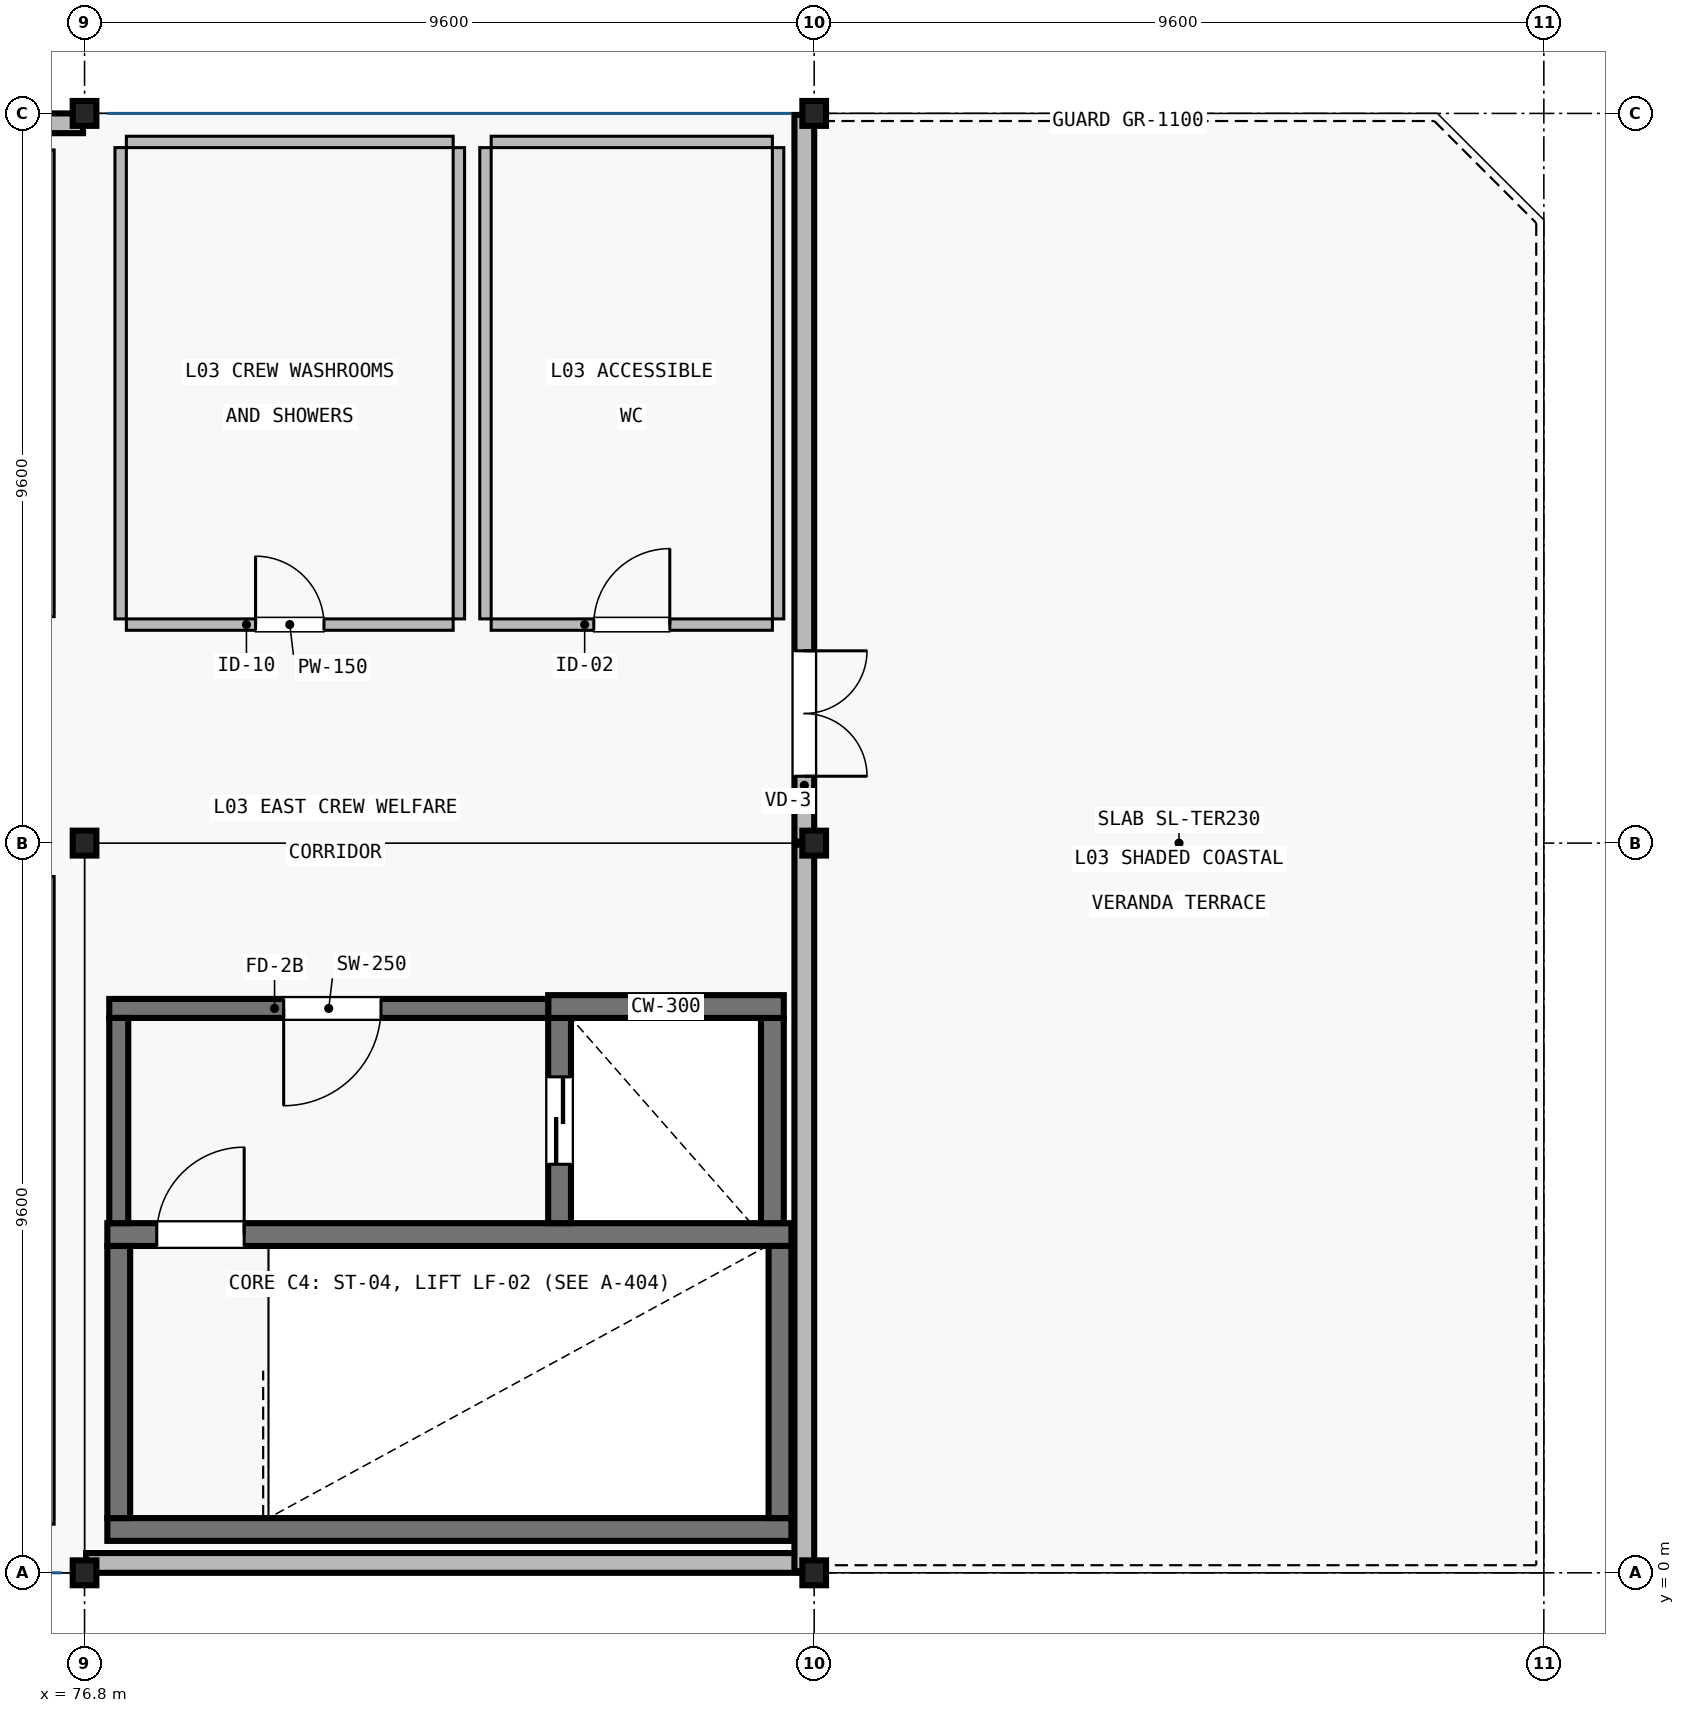
"""IFC4 building model, lengths in metres.
Left out: names, types, materials, properties, quantities, classifications, styles, units other than length and angle.
Written with IfcOpenShell. Run it as: python <this file> out.ifc"""

import sys

from ifc_helpers import new_model, si_unit, direction, frame, frame_2d, origin, origin_2d, place, context, subcontext, project, spatial, rectangle, i_section, extrude, element, fill, save


model = new_model("IFC4")
c1 = context("Model", 3, precision=1e-05, world=origin(), true_north=direction((0.0, 1.0)))
c2 = subcontext(c1, "Body", "Model", "MODEL_VIEW")
j1 = project(units=[si_unit("LENGTHUNIT", "METRE"), si_unit("PLANEANGLEUNIT", "RADIAN")], contexts=[c1])
p1 = place(None, origin())
s1 = spatial("IfcSite", under=j1, at=p1, CompositionType="ELEMENT")
p2 = place(p1, origin())
s2 = spatial("IfcBuilding", under=s1, at=p2, CompositionType="ELEMENT")
p3 = place(p2, frame((0.0, 0.0, 14.7)))
s3 = spatial("IfcBuildingStorey", under=s2, at=p3, CompositionType="ELEMENT", Elevation=14.7)
for number, where, z_axis, x_axis in (
    (1, (76.8, 0.0, 0.0), (0.0, 0.0, 1.0), (1.0, 0.0, 0.0)),
    (2, (76.8, 9.6, 0.0), (0.0, 0.0, 1.0), (1.0, 0.0, 0.0)),
    (3, (76.8, 19.2, 0.0), (0.0, 0.0, 1.0), (1.0, 0.0, 0.0)),
    (4, (86.4, 0.0, 0.0), (0.0, 0.0, 1.0), (1.0, 0.0, 0.0)),
    (5, (86.4, 9.6, 0.0), (0.0, 0.0, 1.0), (1.0, 0.0, 0.0)),
    (6, (86.4, 19.2, 0.0), (0.0, 0.0, 1.0), (1.0, 0.0, 0.0)),
):
    element("IfcColumn", number, at=place(p3, frame(where, z_axis=z_axis, x_axis=x_axis)), inside=s3, PredefinedType="COLUMN", context=c2, shape_type="SweptSolid", body=[
        extrude(i_section(OverallWidth=0.311, OverallDepth=0.327, WebThickness=0.016, FlangeThickness=0.025, FilletRadius=0.015, at=origin_2d()), origin(), (0.0, 0.0, 1.0), 3.95),
    ])
p4 = place(p3, frame((77.1, 0.57, 0.0), z_axis=(0.0, 0.0, 1.0), x_axis=(1.0, 0.0, 0.0)))
e7 = element("IfcWall", 7, at=p4, inside=s3, PredefinedType="SHEAR", context=c2, shape_type="SweptSolid", body=[
    extrude(rectangle(XDim=9.0, YDim=0.3, at=frame_2d((4.5, 0.0))), origin(), (0.0, 0.0, 1.0), 3.95),
])
p5 = place(p3, frame((86.1, 4.45, 0.0), z_axis=(0.0, 0.0, 1.0), x_axis=(-1.0, 0.0, 0.0)))
e8 = element("IfcWall", 8, at=p5, inside=s3, PredefinedType="SHEAR", context=c2, shape_type="SweptSolid", body=[
    extrude(rectangle(XDim=9.0, YDim=0.3, at=frame_2d((4.5, 0.0))), origin(), (0.0, 0.0, 1.0), 4.2),
])
p6 = place(p5, frame((7.2, 0.0, 0.0)))
e9 = element("IfcOpeningElement", 9, at=p6, cuts=e8, PredefinedType="OPENING", context=c2, shape_type="SweptSolid", body=[
    extrude(rectangle(XDim=1.15, YDim=2.15, at=frame_2d((0.575, 1.075))), frame((0.0, 0.16, 0.0), z_axis=(0.0, -1.0, 0.0), x_axis=(1.0, 0.0, 0.0)), (0.0, 0.0, 1.0), 0.32),
])
for number, where, z_axis, x_axis in (
    (10, (77.25, 0.72, 0.0), (0.0, 0.0, 1.0), (0.0, 1.0, 0.0)),
    (11, (85.95, 4.3, 0.0), (0.0, 0.0, 1.0), (0.0, -1.0, 0.0)),
):
    element("IfcWall", number, at=place(p3, frame(where, z_axis=z_axis, x_axis=x_axis)), inside=s3, PredefinedType="SHEAR", context=c2, shape_type="SweptSolid", body=[
        extrude(rectangle(XDim=3.58, YDim=0.3, at=frame_2d((1.79, 0.0))), origin(), (0.0, 0.0, 1.0), 3.95),
    ])
p7 = place(p3, frame((83.05, 7.3, 0.0), z_axis=(0.0, 0.0, 1.0), x_axis=(0.0, -1.0, 0.0)))
e12 = element("IfcWall", 12, at=p7, inside=s3, PredefinedType="SHEAR", context=c2, shape_type="SweptSolid", body=[
    extrude(rectangle(XDim=2.7, YDim=0.3, at=frame_2d((1.35, 0.0))), origin(), (0.0, 0.0, 1.0), 4.2),
])
p8 = place(p7, frame((0.775, 0.0, 0.0)))
e13 = element("IfcOpeningElement", 13, at=p8, cuts=e12, PredefinedType="OPENING", context=c2, shape_type="SweptSolid", body=[
    extrude(rectangle(XDim=1.15, YDim=2.1, at=frame_2d((0.575, 1.05))), frame((0.0, 0.16, 0.0), z_axis=(0.0, -1.0, 0.0), x_axis=(1.0, 0.0, 0.0)), (0.0, 0.0, 1.0), 0.32),
])
p9 = place(p3, frame((85.85, 4.6, 0.0), z_axis=(0.0, 0.0, 1.0), x_axis=(0.0, 1.0, 0.0)))
e14 = element("IfcWall", 14, at=p9, inside=s3, PredefinedType="SHEAR", context=c2, shape_type="SweptSolid", body=[
    extrude(rectangle(XDim=2.7, YDim=0.3, at=frame_2d((1.35, 0.0))), origin(), (0.0, 0.0, 1.0), 4.2),
])
p10 = place(p3, frame((82.9, 7.45, 0.0), z_axis=(0.0, 0.0, 1.0), x_axis=(1.0, 0.0, 0.0)))
e15 = element("IfcWall", 15, at=p10, inside=s3, PredefinedType="SHEAR", context=c2, shape_type="SweptSolid", body=[
    extrude(rectangle(XDim=3.1, YDim=0.3, at=frame_2d((1.55, 0.0))), origin(), (0.0, 0.0, 1.0), 4.2),
])
p11 = place(p3, frame((82.9, 7.425, 0.0), z_axis=(0.0, 0.0, 1.0), x_axis=(-1.0, 0.0, 0.0)))
e16 = element("IfcWall", 16, at=p11, inside=s3, PredefinedType="SHEAR", context=c2, shape_type="SweptSolid", body=[
    extrude(rectangle(XDim=5.775, YDim=0.25, at=frame_2d((2.887, 0.0))), origin(), (0.0, 0.0, 1.0), 3.95),
])
p12 = place(p11, frame((2.2, 0.0, 0.0)))
e17 = element("IfcOpeningElement", 17, at=p12, cuts=e16, PredefinedType="OPENING", context=c2, shape_type="SweptSolid", body=[
    extrude(rectangle(XDim=1.28, YDim=2.2, at=frame_2d((0.64, 1.1))), frame((0.0, 0.135, 0.0), z_axis=(0.0, -1.0, 0.0), x_axis=(1.0, 0.0, 0.0)), (0.0, 0.0, 1.0), 0.27),
])
p13 = place(p3, frame((77.25, 4.6, 0.0), z_axis=(0.0, 0.0, 1.0), x_axis=(0.0, 1.0, 0.0)))
e18 = element("IfcWall", 18, at=p13, inside=s3, PredefinedType="SHEAR", context=c2, shape_type="SweptSolid", body=[
    extrude(rectangle(XDim=2.7, YDim=0.25, at=frame_2d((1.35, 0.0))), origin(), (0.0, 0.0, 1.0), 3.95),
])
p14 = place(p3, frame((67.22, 19.07, 0.0), z_axis=(0.0, 0.0, 1.0), x_axis=(1.0, 0.0, 0.0)))
e19 = element("IfcWall", 19, at=p14, inside=s3, PredefinedType="SOLIDWALL", context=c2, shape_type="SweptSolid", body=[
    extrude(rectangle(XDim=9.56, YDim=0.26, at=frame_2d((4.78, 0.0))), origin(), (0.0, 0.0, 1.0), 3.66),
])
p15 = place(p14, frame((3.43, 0.0, 0.9)))
e20 = element("IfcOpeningElement", 20, at=p15, cuts=e19, PredefinedType="OPENING", context=c2, shape_type="SweptSolid", body=[
    extrude(rectangle(XDim=2.7, YDim=2.4, at=frame_2d((1.35, 1.2))), frame((0.0, 0.14, 0.0), z_axis=(0.0, -1.0, 0.0), x_axis=(1.0, 0.0, 0.0)), (0.0, 0.0, 1.0), 0.28),
])
p16 = place(p3, frame((86.38, 0.13, 0.0), z_axis=(0.0, 0.0, 1.0), x_axis=(-1.0, 0.0, 0.0)))
e21 = element("IfcWall", 21, at=p16, inside=s3, PredefinedType="SOLIDWALL", context=c2, shape_type="SweptSolid", body=[
    extrude(rectangle(XDim=9.56, YDim=0.26, at=frame_2d((4.78, 0.0))), origin(), (0.0, 0.0, 1.0), 3.66),
])
p17 = place(p3, frame((86.27, 9.58, 0.0), z_axis=(0.0, 0.0, 1.0), x_axis=(0.0, -1.0, 0.0)))
e22 = element("IfcWall", 22, at=p17, inside=s3, PredefinedType="SOLIDWALL", context=c2, shape_type="SweptSolid", body=[
    extrude(rectangle(XDim=9.56, YDim=0.26, at=frame_2d((4.78, 0.0))), origin(), (0.0, 0.0, 1.0), 3.493),
])
p18 = place(p3, frame((86.27, 19.18, 0.0), z_axis=(0.0, 0.0, 1.0), x_axis=(0.0, -1.0, 0.0)))
e23 = element("IfcWall", 23, at=p18, inside=s3, PredefinedType="SOLIDWALL", context=c2, shape_type="SweptSolid", body=[
    extrude(rectangle(XDim=9.56, YDim=0.26, at=frame_2d((4.78, 0.0))), origin(), (0.0, 0.0, 1.0), 3.493),
])
p19 = place(p18, frame((7.05, 0.0, 0.0)))
e24 = element("IfcOpeningElement", 24, at=p19, cuts=e23, PredefinedType="OPENING", context=c2, shape_type="SweptSolid", body=[
    extrude(rectangle(XDim=1.65, YDim=2.2, at=frame_2d((0.825, 1.1))), frame((0.0, 0.14, 0.0), z_axis=(0.0, -1.0, 0.0), x_axis=(1.0, 0.0, 0.0)), (0.0, 0.0, 1.0), 0.28),
])
p20 = place(p3, frame((76.33, 9.16, 0.0), z_axis=(0.0, 0.0, 1.0), x_axis=(0.0, -1.0, 0.0)))
e25 = element("IfcWall", 25, at=p20, inside=s3, PredefinedType="PARTITIONING", context=c2, shape_type="SweptSolid", body=[
    extrude(rectangle(XDim=8.52, YDim=0.14, at=frame_2d((4.26, 0.0))), origin(), (0.0, 0.0, 1.0), 3.59),
])
p21 = place(p3, frame((76.31, 18.72, 0.0), z_axis=(0.0, 0.0, 1.0), x_axis=(0.0, -1.0, 0.0)))
e26 = element("IfcWall", 26, at=p21, inside=s3, PredefinedType="PARTITIONING", context=c2, shape_type="SweptSolid", body=[
    extrude(rectangle(XDim=6.14, YDim=0.18, at=frame_2d((3.07, 0.0))), origin(), (0.0, 0.0, 1.0), 3.59),
])
p22 = place(p3, frame((81.65, 12.475, 0.0), z_axis=(0.0, 0.0, 1.0), x_axis=(-1.0, 0.0, 0.0)))
e27 = element("IfcWall", 27, at=p22, inside=s3, PredefinedType="PLUMBINGWALL", context=c2, shape_type="SweptSolid", body=[
    extrude(rectangle(XDim=4.3, YDim=0.15, at=frame_2d((2.15, 0.0))), origin(), (0.0, 0.0, 1.0), 3.59),
])
p23 = place(p22, frame((1.7, 0.0, 0.0)))
e28 = element("IfcOpeningElement", 28, at=p23, cuts=e27, PredefinedType="OPENING", context=c2, shape_type="SweptSolid", body=[
    extrude(rectangle(XDim=0.9, YDim=2.1, at=frame_2d((0.45, 1.05))), frame((0.0, 0.085, 0.0), z_axis=(0.0, -1.0, 0.0), x_axis=(1.0, 0.0, 0.0)), (0.0, 0.0, 1.0), 0.17),
])
p24 = place(p3, frame((77.35, 18.825, 0.0), z_axis=(0.0, 0.0, 1.0), x_axis=(1.0, 0.0, 0.0)))
e29 = element("IfcWall", 29, at=p24, inside=s3, PredefinedType="PLUMBINGWALL", context=c2, shape_type="SweptSolid", body=[
    extrude(rectangle(XDim=4.3, YDim=0.15, at=frame_2d((2.15, 0.0))), origin(), (0.0, 0.0, 1.0), 3.59),
])
for number, where, z_axis, x_axis in (
    (30, (77.275, 12.55, 0.0), (0.0, 0.0, 1.0), (0.0, 1.0, 0.0)),
    (31, (81.725, 18.75, 0.0), (0.0, 0.0, 1.0), (0.0, -1.0, 0.0)),
):
    element("IfcWall", number, at=place(p3, frame(where, z_axis=z_axis, x_axis=x_axis)), inside=s3, PredefinedType="PLUMBINGWALL", context=c2, shape_type="SweptSolid", body=[
        extrude(rectangle(XDim=6.2, YDim=0.15, at=frame_2d((3.1, 0.0))), origin(), (0.0, 0.0, 1.0), 3.59),
    ])
p25 = place(p3, frame((85.85, 12.475, 0.0), z_axis=(0.0, 0.0, 1.0), x_axis=(-1.0, 0.0, 0.0)))
e32 = element("IfcWall", 32, at=p25, inside=s3, PredefinedType="PLUMBINGWALL", context=c2, shape_type="SweptSolid", body=[
    extrude(rectangle(XDim=3.7, YDim=0.15, at=frame_2d((1.85, 0.0))), origin(), (0.0, 0.0, 1.0), 3.59),
])
p26 = place(p25, frame((1.35, 0.0, 0.0)))
e33 = element("IfcOpeningElement", 33, at=p26, cuts=e32, PredefinedType="OPENING", context=c2, shape_type="SweptSolid", body=[
    extrude(rectangle(XDim=1.0, YDim=2.15, at=frame_2d((0.5, 1.075))), frame((0.0, 0.085, 0.0), z_axis=(0.0, -1.0, 0.0), x_axis=(1.0, 0.0, 0.0)), (0.0, 0.0, 1.0), 0.17),
])
p27 = place(p3, frame((82.15, 18.825, 0.0), z_axis=(0.0, 0.0, 1.0), x_axis=(1.0, 0.0, 0.0)))
e34 = element("IfcWall", 34, at=p27, inside=s3, PredefinedType="PLUMBINGWALL", context=c2, shape_type="SweptSolid", body=[
    extrude(rectangle(XDim=3.7, YDim=0.15, at=frame_2d((1.85, 0.0))), origin(), (0.0, 0.0, 1.0), 3.59),
])
for number, where, z_axis, x_axis in (
    (35, (82.075, 12.55, 0.0), (0.0, 0.0, 1.0), (0.0, 1.0, 0.0)),
    (36, (85.925, 18.75, 0.0), (0.0, 0.0, 1.0), (0.0, -1.0, 0.0)),
):
    element("IfcWall", number, at=place(p3, frame(where, z_axis=z_axis, x_axis=x_axis)), inside=s3, PredefinedType="PLUMBINGWALL", context=c2, shape_type="SweptSolid", body=[
        extrude(rectangle(XDim=6.2, YDim=0.15, at=frame_2d((3.1, 0.0))), origin(), (0.0, 0.0, 1.0), 3.59),
    ])
p28 = place(p6, frame((1.15, 0.0, 0.0), z_axis=(0.0, 0.0, 1.0), x_axis=(-1.0, 0.0, 0.0)))
e37 = element("IfcDoor", 37, at=p28, inside=s3, OperationType="SINGLE_SWING_LEFT", PredefinedType="DOOR", context=c2, shape_type="SweptSolid", body=[
    extrude(rectangle(XDim=1.15, YDim=2.15, at=frame_2d((0.575, 1.075))), frame((0.0, 0.025, 0.0), z_axis=(0.0, -1.0, 0.0), x_axis=(1.0, 0.0, 0.0)), (0.0, 0.0, 1.0), 0.05),
])
fill(e9, e37)
p29 = place(p8, frame((1.15, 0.0, 0.0), z_axis=(0.0, 0.0, 1.0), x_axis=(-1.0, 0.0, 0.0)))
e38 = element("IfcDoor", 38, at=p29, inside=s3, OperationType="DOUBLE_DOOR_SLIDING", PredefinedType="DOOR", context=c2, shape_type="SweptSolid", body=[
    extrude(rectangle(XDim=1.15, YDim=2.1, at=frame_2d((0.575, 1.05))), frame((0.0, 0.025, 0.0), z_axis=(0.0, -1.0, 0.0), x_axis=(1.0, 0.0, 0.0)), (0.0, 0.0, 1.0), 0.05),
])
fill(e13, e38)
p30 = place(p12, origin())
e39 = element("IfcDoor", 39, at=p30, inside=s3, OperationType="SINGLE_SWING_RIGHT", PredefinedType="DOOR", context=c2, shape_type="SweptSolid", body=[
    extrude(rectangle(XDim=1.28, YDim=2.2, at=frame_2d((0.64, 1.1))), frame((0.0, 0.025, 0.0), z_axis=(0.0, -1.0, 0.0), x_axis=(1.0, 0.0, 0.0)), (0.0, 0.0, 1.0), 0.05),
])
fill(e17, e39)
p31 = place(p19, origin())
e40 = element("IfcDoor", 40, at=p31, inside=s3, OperationType="DOUBLE_DOOR_SINGLE_SWING", PredefinedType="DOOR", context=c2, shape_type="SweptSolid", body=[
    extrude(rectangle(XDim=1.65, YDim=2.2, at=frame_2d((0.825, 1.1))), frame((0.0, 0.025, 0.0), z_axis=(0.0, -1.0, 0.0), x_axis=(1.0, 0.0, 0.0)), (0.0, 0.0, 1.0), 0.05),
])
fill(e24, e40)
p32 = place(p23, frame((0.9, 0.0, 0.0), z_axis=(0.0, 0.0, 1.0), x_axis=(-1.0, 0.0, 0.0)))
e41 = element("IfcDoor", 41, at=p32, inside=s3, OperationType="SINGLE_SWING_RIGHT", PredefinedType="DOOR", context=c2, shape_type="SweptSolid", body=[
    extrude(rectangle(XDim=0.9, YDim=2.1, at=frame_2d((0.45, 1.05))), frame((0.0, 0.025, 0.0), z_axis=(0.0, -1.0, 0.0), x_axis=(1.0, 0.0, 0.0)), (0.0, 0.0, 1.0), 0.05),
])
fill(e28, e41)
p33 = place(p26, frame((1.0, 0.0, 0.0), z_axis=(0.0, 0.0, 1.0), x_axis=(-1.0, 0.0, 0.0)))
e42 = element("IfcDoor", 42, at=p33, inside=s3, OperationType="SINGLE_SWING_LEFT", PredefinedType="DOOR", context=c2, shape_type="SweptSolid", body=[
    extrude(rectangle(XDim=1.0, YDim=2.15, at=frame_2d((0.5, 1.075))), frame((0.0, 0.025, 0.0), z_axis=(0.0, -1.0, 0.0), x_axis=(1.0, 0.0, 0.0)), (0.0, 0.0, 1.0), 0.05),
])
fill(e33, e42)
save(model, sys.argv[1])
